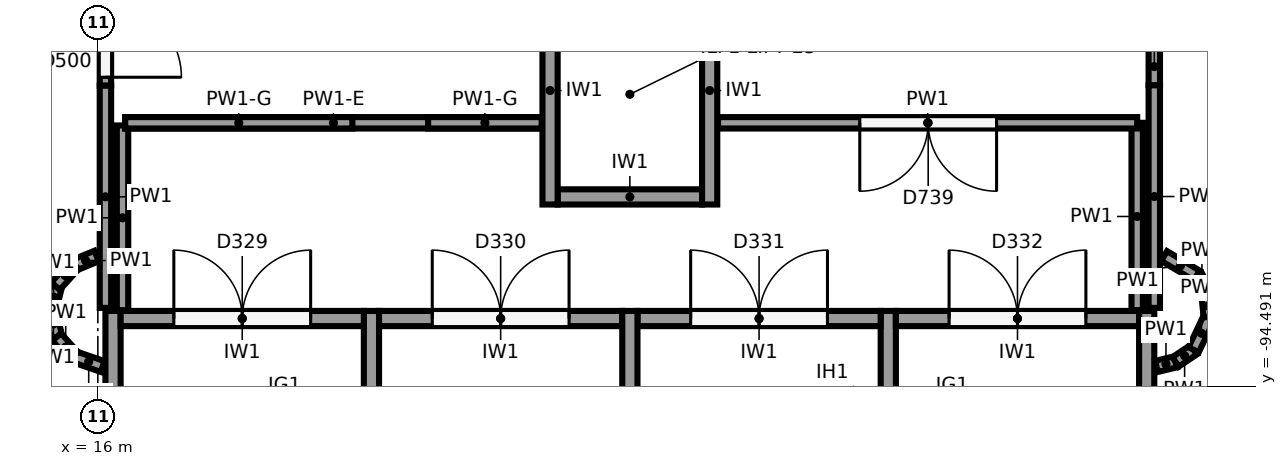
"""IFC4 building model, lengths in metres.
Left out: names, types, materials, properties, quantities, classifications, styles, units other than length and angle.
Written with IfcOpenShell. Run it as: python <this file> out.ifc"""

import sys

from ifc_helpers import new_model, si_unit, direction, frame, frame_2d, origin, origin_2d, place, context, subcontext, project, spatial, rectangle, circle, extrude, element, fill, save


model = new_model("IFC4")
c1 = context("Model", 3, precision=1e-05, world=origin(), true_north=direction((0.0, 1.0)))
c2 = subcontext(c1, "Body", "Model", "MODEL_VIEW")
j1 = project(units=[si_unit("LENGTHUNIT", "METRE"), si_unit("PLANEANGLEUNIT", "RADIAN")], contexts=[c1])
p1 = place(None, origin())
s1 = spatial("IfcSite", under=j1, at=p1, CompositionType="ELEMENT")
p2 = place(p1, origin())
s2 = spatial("IfcBuilding", under=s1, at=p2, CompositionType="ELEMENT")
p3 = place(p2, frame((0.0, 0.0, -4.0)))
s3 = spatial("IfcBuildingStorey", under=s2, at=p3, CompositionType="ELEMENT", Elevation=-4.0)
p4 = place(p3, frame((19.627, -89.904, -1.2), z_axis=(0.0, 0.0, 1.0), x_axis=(1.0, 0.0, 0.0)))
e1 = element("IfcColumn", 1, at=p4, inside=s3, PredefinedType="COLUMN", context=c2, shape_type="SweptSolid", body=[
    extrude(circle(Radius=0.55, at=origin_2d()), origin(), (0.0, 0.0, 1.0), 5.2),
])
for number, where, z_axis, x_axis in (
    (2, (16.2, -102.3, -1.2), (0.0, 0.0, 1.0), (0.0, 1.0, 0.0)),
    (3, (23.0, -102.3, -1.2), (0.0, 0.0, 1.0), (0.0, 1.0, 0.0)),
    (4, (29.8, -102.3, -1.2), (0.0, 0.0, 1.0), (0.0, 1.0, 0.0)),
    (5, (19.6, -102.3, -1.2), (0.0, 0.0, 1.0), (0.0, 1.0, 0.0)),
    (6, (26.4, -102.3, -1.2), (0.0, 0.0, 1.0), (0.0, 1.0, 0.0)),
):
    element("IfcWall", number, at=place(p3, frame(where, z_axis=z_axis, x_axis=x_axis)), inside=s3, PredefinedType="SHEAR", context=c2, shape_type="SweptSolid", body=[
        extrude(rectangle(XDim=8.8, YDim=0.2, at=frame_2d((4.4, 0.0))), origin(), (0.0, 0.0, 1.0), 4.8),
    ])
p5 = place(p3, frame((16.3, -93.6, -1.2), z_axis=(0.0, 0.0, 1.0), x_axis=(1.0, 0.0, 0.0)))
e7 = element("IfcWall", 7, at=p5, inside=s3, PredefinedType="SHEAR", context=c2, shape_type="SweptSolid", body=[
    extrude(rectangle(XDim=3.2, YDim=0.2, at=frame_2d((1.6, 0.0))), origin(), (0.0, 0.0, 1.0), 4.8),
])
p6 = place(p5, frame((0.7, 0.0, 1.2)))
e8 = element("IfcOpeningElement", 8, at=p6, cuts=e7, PredefinedType="OPENING", context=c2, shape_type="SweptSolid", body=[
    extrude(rectangle(XDim=1.8, YDim=2.1, at=frame_2d((0.9, 1.05))), frame((0.0, 0.11, 0.0), z_axis=(0.0, -1.0, 0.0), x_axis=(1.0, 0.0, 0.0)), (0.0, 0.0, 1.0), 0.22),
])
p7 = place(p3, frame((19.7, -93.6, -1.2), z_axis=(0.0, 0.0, 1.0), x_axis=(1.0, 0.0, 0.0)))
e9 = element("IfcWall", 9, at=p7, inside=s3, PredefinedType="SHEAR", context=c2, shape_type="SweptSolid", body=[
    extrude(rectangle(XDim=3.2, YDim=0.2, at=frame_2d((1.6, 0.0))), origin(), (0.0, 0.0, 1.0), 4.8),
])
p8 = place(p7, frame((0.7, 0.0, 1.2)))
e10 = element("IfcOpeningElement", 10, at=p8, cuts=e9, PredefinedType="OPENING", context=c2, shape_type="SweptSolid", body=[
    extrude(rectangle(XDim=1.8, YDim=2.1, at=frame_2d((0.9, 1.05))), frame((0.0, 0.11, 0.0), z_axis=(0.0, -1.0, 0.0), x_axis=(1.0, 0.0, 0.0)), (0.0, 0.0, 1.0), 0.22),
])
p9 = place(p3, frame((23.1, -93.6, -1.2), z_axis=(0.0, 0.0, 1.0), x_axis=(1.0, 0.0, 0.0)))
e11 = element("IfcWall", 11, at=p9, inside=s3, PredefinedType="SHEAR", context=c2, shape_type="SweptSolid", body=[
    extrude(rectangle(XDim=3.2, YDim=0.2, at=frame_2d((1.6, 0.0))), origin(), (0.0, 0.0, 1.0), 4.8),
])
p10 = place(p9, frame((0.7, 0.0, 1.2)))
e12 = element("IfcOpeningElement", 12, at=p10, cuts=e11, PredefinedType="OPENING", context=c2, shape_type="SweptSolid", body=[
    extrude(rectangle(XDim=1.8, YDim=2.1, at=frame_2d((0.9, 1.05))), frame((0.0, 0.11, 0.0), z_axis=(0.0, -1.0, 0.0), x_axis=(1.0, 0.0, 0.0)), (0.0, 0.0, 1.0), 0.22),
])
p11 = place(p3, frame((26.5, -93.6, -1.2), z_axis=(0.0, 0.0, 1.0), x_axis=(1.0, 0.0, 0.0)))
e13 = element("IfcWall", 13, at=p11, inside=s3, PredefinedType="SHEAR", context=c2, shape_type="SweptSolid", body=[
    extrude(rectangle(XDim=3.2, YDim=0.2, at=frame_2d((1.6, 0.0))), origin(), (0.0, 0.0, 1.0), 4.8),
])
p12 = place(p11, frame((0.7, 0.0, 1.2)))
e14 = element("IfcOpeningElement", 14, at=p12, cuts=e13, PredefinedType="OPENING", context=c2, shape_type="SweptSolid", body=[
    extrude(rectangle(XDim=1.8, YDim=2.1, at=frame_2d((0.9, 1.05))), frame((0.0, 0.11, 0.0), z_axis=(0.0, -1.0, 0.0), x_axis=(1.0, 0.0, 0.0)), (0.0, 0.0, 1.0), 0.22),
])
for number, where, z_axis, x_axis in (
    (15, (21.95, -92.1, -1.2), (0.0, 0.0, 1.0), (0.0, 1.0, 0.0)),
    (16, (24.05, -92.1, -1.2), (0.0, 0.0, 1.0), (0.0, 1.0, 0.0)),
):
    element("IfcWall", number, at=place(p3, frame(where, z_axis=z_axis, x_axis=x_axis)), inside=s3, PredefinedType="SHEAR", context=c2, shape_type="SweptSolid", body=[
        extrude(rectangle(XDim=3.0, YDim=0.2, at=frame_2d((1.5, 0.0))), origin(), (0.0, 0.0, 1.0), 4.8),
    ])
p13 = place(p3, frame((22.05, -92.0, -1.2), z_axis=(0.0, 0.0, 1.0), x_axis=(1.0, 0.0, 0.0)))
e17 = element("IfcWall", 17, at=p13, inside=s3, PredefinedType="SHEAR", context=c2, shape_type="SweptSolid", body=[
    extrude(rectangle(XDim=1.9, YDim=0.2, at=frame_2d((0.95, 0.0))), origin(), (0.0, 0.0, 1.0), 4.8),
])
p14 = place(p3, frame((16.1, -89.076, 0.0), z_axis=(0.0, 0.0, 1.0), x_axis=(0.0, -1.0, 0.0)))
e18 = element("IfcWall", 18, at=p14, inside=s3, PredefinedType="PARTITIONING", context=c2, shape_type="SweptSolid", body=[
    extrude(rectangle(XDim=1.461, YDim=0.15, at=frame_2d((0.731, 0.0))), origin(), (0.0, 0.0, 1.0), 2.3),
])
p15 = place(p14, frame((0.35, 0.0, 0.0)))
e19 = element("IfcOpeningElement", 19, at=p15, cuts=e18, PredefinedType="OPENING", context=c2, shape_type="SweptSolid", body=[
    extrude(rectangle(XDim=1.0, YDim=2.1, at=frame_2d((0.5, 1.05))), frame((0.0, 0.085, 0.0), z_axis=(0.0, -1.0, 0.0), x_axis=(1.0, 0.0, 0.0)), (0.0, 0.0, 1.0), 0.17),
])
p16 = place(p3, frame((16.1, -90.537, 0.0), z_axis=(0.0, 0.0, 1.0), x_axis=(0.0, -1.0, 0.0)))
e20 = element("IfcWall", 20, at=p16, inside=s3, PredefinedType="PARTITIONING", context=c2, shape_type="SweptSolid", body=[
    extrude(rectangle(XDim=2.923, YDim=0.15, at=frame_2d((1.461, 0.0))), origin(), (0.0, 0.0, 1.0), 3.6),
])
p17 = place(p3, frame((29.9, -93.46, 0.0), z_axis=(0.0, 0.0, 1.0), x_axis=(0.0, 1.0, 0.0)))
e21 = element("IfcWall", 21, at=p17, inside=s3, PredefinedType="PARTITIONING", context=c2, shape_type="SweptSolid", body=[
    extrude(rectangle(XDim=2.93, YDim=0.15, at=frame_2d((1.465, 0.0))), origin(), (0.0, 0.0, 1.0), 3.6),
])
p18 = place(p3, frame((29.9, -90.53, 0.0), z_axis=(0.0, 0.0, 1.0), x_axis=(0.0, 1.0, 0.0)))
e22 = element("IfcWall", 22, at=p18, inside=s3, PredefinedType="PARTITIONING", context=c2, shape_type="SweptSolid", body=[
    extrude(rectangle(XDim=0.489, YDim=0.15, at=frame_2d((0.244, 0.0))), origin(), (0.0, 0.0, 1.0), 2.3),
])
p19 = place(p3, frame((16.325, -91.06, 0.0), z_axis=(0.0, 0.0, 1.0), x_axis=(0.0, -1.0, 0.0)))
e23 = element("IfcWall", 23, at=p19, inside=s3, PredefinedType="PARTITIONING", context=c2, shape_type="SweptSolid", body=[
    extrude(rectangle(XDim=2.43, YDim=0.15, at=frame_2d((1.215, 0.0))), origin(), (0.0, 0.0, 1.0), 3.6),
])
p20 = place(p3, frame((29.675, -93.49, 0.0), z_axis=(0.0, 0.0, 1.0), x_axis=(0.0, 1.0, 0.0)))
e24 = element("IfcWall", 24, at=p20, inside=s3, PredefinedType="PARTITIONING", context=c2, shape_type="SweptSolid", body=[
    extrude(rectangle(XDim=2.465, YDim=0.15, at=frame_2d((1.232, 0.0))), origin(), (0.0, 0.0, 1.0), 3.6),
])
p21 = place(p3, frame((29.675, -91.025, 0.0), z_axis=(0.0, 0.0, 1.0), x_axis=(-1.0, 0.0, 0.0)))
e25 = element("IfcWall", 25, at=p21, inside=s3, PredefinedType="PARTITIONING", context=c2, shape_type="SweptSolid", body=[
    extrude(rectangle(XDim=5.515, YDim=0.15, at=frame_2d((2.758, 0.0))), origin(), (0.0, 0.0, 1.0), 3.6),
])
p22 = place(p21, frame((1.85, 0.0, 0.0)))
e26 = element("IfcOpeningElement", 26, at=p22, cuts=e25, PredefinedType="OPENING", context=c2, shape_type="SweptSolid", body=[
    extrude(rectangle(XDim=1.8, YDim=2.1, at=frame_2d((0.9, 1.05))), frame((0.0, 0.085, 0.0), z_axis=(0.0, -1.0, 0.0), x_axis=(1.0, 0.0, 0.0)), (0.0, 0.0, 1.0), 0.17),
])
p23 = place(p3, frame((21.84, -91.025, 0.0), z_axis=(0.0, 0.0, 1.0), x_axis=(-1.0, 0.0, 0.0)))
e27 = element("IfcWall", 27, at=p23, inside=s3, PredefinedType="PARTITIONING", context=c2, shape_type="SweptSolid", body=[
    extrude(rectangle(XDim=5.48, YDim=0.15, at=frame_2d((2.74, 0.0))), origin(), (0.0, 0.0, 1.0), 2.85),
])
p24 = place(p3, frame((21.84, -91.025, 2.85), z_axis=(0.0, 0.0, 1.0), x_axis=(-1.0, 0.0, 0.0)))
e28 = element("IfcWall", 28, at=p24, inside=s3, PredefinedType="PARTITIONING", context=c2, shape_type="SweptSolid", body=[
    extrude(rectangle(XDim=1.495, YDim=0.15, at=frame_2d((0.747, 0.0))), origin(), (0.0, 0.0, 1.0), 0.75),
])
p25 = place(p3, frame((19.349, -91.025, 2.85), z_axis=(0.0, 0.0, 1.0), x_axis=(-1.0, 0.0, 0.0)))
e29 = element("IfcWall", 29, at=p25, inside=s3, PredefinedType="PARTITIONING", context=c2, shape_type="SweptSolid", body=[
    extrude(rectangle(XDim=2.989, YDim=0.15, at=frame_2d((1.495, 0.0))), origin(), (0.0, 0.0, 1.0), 0.75),
])
p26 = place(p3, frame((15.464, -93.137, 0.0), z_axis=(0.0, 0.0, 1.0), x_axis=(-0.242535625036, -0.970142500145, 0.0)))
e30 = element("IfcWall", 30, at=p26, inside=s3, PredefinedType="PARTITIONING", context=c2, shape_type="SweptSolid", body=[
    extrude(rectangle(XDim=0.375, YDim=0.15, at=frame_2d((0.187, 0.0))), origin(), (0.0, 0.0, 1.0), 3.6),
])
p27 = place(p3, frame((15.373, -93.5, 0.0), z_axis=(0.0, 0.0, 1.0), x_axis=(0.242535625036, -0.970142500145, 0.0)))
e31 = element("IfcWall", 31, at=p27, inside=s3, PredefinedType="PARTITIONING", context=c2, shape_type="SweptSolid", body=[
    extrude(rectangle(XDim=0.353, YDim=0.15, at=frame_2d((0.177, 0.0))), origin(), (0.0, 0.0, 1.0), 3.6),
])
p28 = place(p3, frame((15.458, -93.843, 0.0), z_axis=(0.0, 0.0, 1.0), x_axis=(0.671779735796, -0.740750961237, 0.0)))
e32 = element("IfcWall", 32, at=p28, inside=s3, PredefinedType="PARTITIONING", context=c2, shape_type="SweptSolid", body=[
    extrude(rectangle(XDim=0.354, YDim=0.15, at=frame_2d((0.177, 0.0))), origin(), (0.0, 0.0, 1.0), 3.6),
])
p29 = place(p3, frame((15.696, -94.105, 0.0), z_axis=(0.0, 0.0, 1.0), x_axis=(0.945493169619, -0.32564192943, 0.0)))
e33 = element("IfcWall", 33, at=p29, inside=s3, PredefinedType="PARTITIONING", context=c2, shape_type="SweptSolid", body=[
    extrude(rectangle(XDim=0.388, YDim=0.15, at=frame_2d((0.194, 0.0))), origin(), (0.0, 0.0, 1.0), 3.6),
])
p30 = place(p3, frame((29.928, -94.23, 0.0), z_axis=(0.0, 0.0, 1.0), x_axis=(0.973130593004, 0.230253879357, 0.0)))
e34 = element("IfcWall", 34, at=p30, inside=s3, PredefinedType="PARTITIONING", context=c2, shape_type="SweptSolid", body=[
    extrude(rectangle(XDim=0.258, YDim=0.15, at=frame_2d((0.129, 0.0))), origin(), (0.0, 0.0, 1.0), 3.6),
])
p31 = place(p3, frame((30.179, -94.17, 0.0), z_axis=(0.0, 0.0, 1.0), x_axis=(0.831397130511, 0.555678694372, 0.0)))
e35 = element("IfcWall", 35, at=p31, inside=s3, PredefinedType="PARTITIONING", context=c2, shape_type="SweptSolid", body=[
    extrude(rectangle(XDim=0.288, YDim=0.15, at=frame_2d((0.144, 0.0))), origin(), (0.0, 0.0, 1.0), 3.6),
])
p32 = place(p3, frame((30.418, -94.01, 0.0), z_axis=(0.0, 0.0, 1.0), x_axis=(0.427757963167, 0.903893315025, 0.0)))
e36 = element("IfcWall", 36, at=p32, inside=s3, PredefinedType="PARTITIONING", context=c2, shape_type="SweptSolid", body=[
    extrude(rectangle(XDim=0.479, YDim=0.15, at=frame_2d((0.24, 0.0))), origin(), (0.0, 0.0, 1.0), 3.6),
])
p33 = place(p3, frame((30.624, -93.577, 0.0), z_axis=(0.0, 0.0, 1.0), x_axis=(-0.0978334953, 0.99520279702, 0.0)))
e37 = element("IfcWall", 37, at=p33, inside=s3, PredefinedType="PARTITIONING", context=c2, shape_type="SweptSolid", body=[
    extrude(rectangle(XDim=0.29, YDim=0.15, at=frame_2d((0.145, 0.0))), origin(), (0.0, 0.0, 1.0), 3.6),
])
p34 = place(p3, frame((30.595, -93.289, 0.0), z_axis=(0.0, 0.0, 1.0), x_axis=(-0.471682765858, 0.881768319, 0.0)))
e38 = element("IfcWall", 38, at=p34, inside=s3, PredefinedType="PARTITIONING", context=c2, shape_type="SweptSolid", body=[
    extrude(rectangle(XDim=0.289, YDim=0.15, at=frame_2d((0.145, 0.0))), origin(), (0.0, 0.0, 1.0), 3.6),
])
p35 = place(p3, frame((30.459, -93.034, 0.0), z_axis=(0.0, 0.0, 1.0), x_axis=(-0.85856712863, 0.512701166017, 0.0)))
e39 = element("IfcWall", 39, at=p35, inside=s3, PredefinedType="PARTITIONING", context=c2, shape_type="SweptSolid", body=[
    extrude(rectangle(XDim=0.5, YDim=0.15, at=frame_2d((0.25, 0.0))), origin(), (0.0, 0.0, 1.0), 3.6),
])
p36 = place(p3, frame((15.983, -92.778, 0.0), z_axis=(0.0, 0.0, 1.0), x_axis=(-0.924710471816, -0.380671174788, 0.0)))
e40 = element("IfcWall", 40, at=p36, inside=s3, PredefinedType="PARTITIONING", context=c2, shape_type="SweptSolid", body=[
    extrude(rectangle(XDim=0.312, YDim=0.15, at=frame_2d((0.156, 0.0))), origin(), (0.0, 0.0, 1.0), 3.6),
])
p37 = place(p3, frame((15.695, -92.896, 0.0), z_axis=(0.0, 0.0, 1.0), x_axis=(-0.671204763042, -0.741271991964, 0.0)))
e41 = element("IfcWall", 41, at=p37, inside=s3, PredefinedType="PARTITIONING", context=c2, shape_type="SweptSolid", body=[
    extrude(rectangle(XDim=0.373, YDim=0.15, at=frame_2d((0.187, 0.0))), origin(), (0.0, 0.0, 1.0), 3.6),
])
p38 = place(p6, origin())
e42 = element("IfcDoor", 42, at=p38, inside=s3, OperationType="DOUBLE_DOOR_SINGLE_SWING", PredefinedType="DOOR", context=c2, shape_type="SweptSolid", body=[
    extrude(rectangle(XDim=1.8, YDim=2.1, at=frame_2d((0.9, 1.05))), frame((0.0, 0.025, 0.0), z_axis=(0.0, -1.0, 0.0), x_axis=(1.0, 0.0, 0.0)), (0.0, 0.0, 1.0), 0.05),
])
fill(e8, e42)
p39 = place(p8, origin())
e43 = element("IfcDoor", 43, at=p39, inside=s3, OperationType="DOUBLE_DOOR_SINGLE_SWING", PredefinedType="DOOR", context=c2, shape_type="SweptSolid", body=[
    extrude(rectangle(XDim=1.8, YDim=2.1, at=frame_2d((0.9, 1.05))), frame((0.0, 0.025, 0.0), z_axis=(0.0, -1.0, 0.0), x_axis=(1.0, 0.0, 0.0)), (0.0, 0.0, 1.0), 0.05),
])
fill(e10, e43)
p40 = place(p10, origin())
e44 = element("IfcDoor", 44, at=p40, inside=s3, OperationType="DOUBLE_DOOR_SINGLE_SWING", PredefinedType="DOOR", context=c2, shape_type="SweptSolid", body=[
    extrude(rectangle(XDim=1.8, YDim=2.1, at=frame_2d((0.9, 1.05))), frame((0.0, 0.025, 0.0), z_axis=(0.0, -1.0, 0.0), x_axis=(1.0, 0.0, 0.0)), (0.0, 0.0, 1.0), 0.05),
])
fill(e12, e44)
p41 = place(p12, origin())
e45 = element("IfcDoor", 45, at=p41, inside=s3, OperationType="DOUBLE_DOOR_SINGLE_SWING", PredefinedType="DOOR", context=c2, shape_type="SweptSolid", body=[
    extrude(rectangle(XDim=1.8, YDim=2.1, at=frame_2d((0.9, 1.05))), frame((0.0, 0.025, 0.0), z_axis=(0.0, -1.0, 0.0), x_axis=(1.0, 0.0, 0.0)), (0.0, 0.0, 1.0), 0.05),
])
fill(e14, e45)
p42 = place(p15, origin())
e46 = element("IfcDoor", 46, at=p42, inside=s3, OperationType="SINGLE_SWING_RIGHT", PredefinedType="DOOR", context=c2, shape_type="SweptSolid", body=[
    extrude(rectangle(XDim=1.0, YDim=2.1, at=frame_2d((0.5, 1.05))), frame((0.0, 0.025, 0.0), z_axis=(0.0, -1.0, 0.0), x_axis=(1.0, 0.0, 0.0)), (0.0, 0.0, 1.0), 0.05),
])
fill(e19, e46)
p43 = place(p22, origin())
e47 = element("IfcDoor", 47, at=p43, inside=s3, OperationType="DOUBLE_DOOR_SINGLE_SWING", PredefinedType="DOOR", context=c2, shape_type="SweptSolid", body=[
    extrude(rectangle(XDim=1.8, YDim=2.1, at=frame_2d((0.9, 1.05))), frame((0.0, 0.025, 0.0), z_axis=(0.0, -1.0, 0.0), x_axis=(1.0, 0.0, 0.0)), (0.0, 0.0, 1.0), 0.05),
])
fill(e26, e47)
save(model, sys.argv[1])
